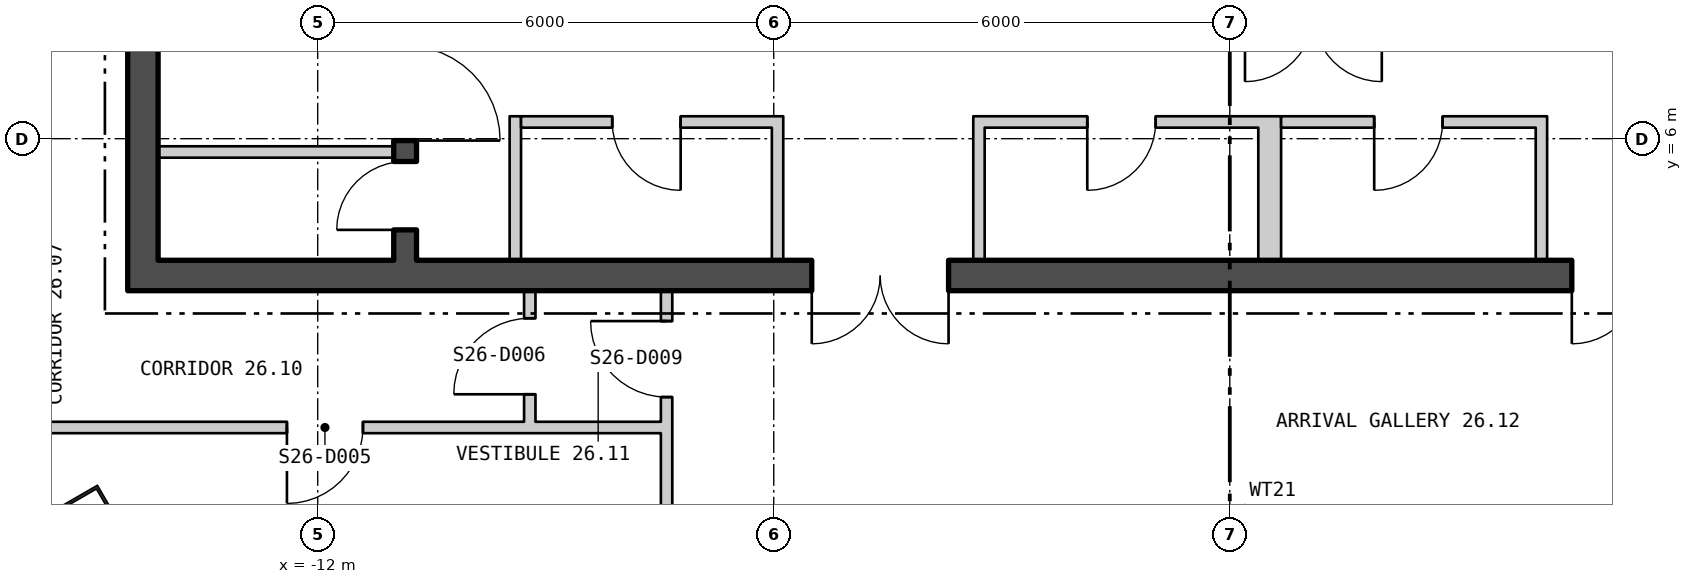
"""IFC4 building model, lengths in metres.
Left out: names, types, materials, properties, quantities, classifications, styles, units other than length and angle.
Written with IfcOpenShell. Run it as: python <this file> out.ifc"""

import sys

from ifc_helpers import new_model, si_unit, direction, frame, frame_2d, origin, origin_2d, place, context, subcontext, project, spatial, polyline, rectangle, hollow_rectangle, outline, extrude, element, fill, save


model = new_model("IFC4")
c1 = context("Model", 3, precision=1e-05, world=origin(), true_north=direction((0.0, 1.0)))
c2 = subcontext(c1, "Body", "Model", "MODEL_VIEW")
j1 = project(units=[si_unit("LENGTHUNIT", "METRE"), si_unit("PLANEANGLEUNIT", "RADIAN")], contexts=[c1])
p1 = place(None, origin())
s1 = spatial("IfcSite", under=j1, at=p1, CompositionType="ELEMENT")
p2 = place(p1, origin())
s2 = spatial("IfcBuilding", under=s1, at=p2, CompositionType="ELEMENT")
p3 = place(p2, frame((0.0, 0.0, 329.4)))
s3 = spatial("IfcBuildingStorey", under=s2, at=p3, CompositionType="ELEMENT", Elevation=329.4)
p4 = place(p3, frame((-15.088, 1.073, 0.0), z_axis=(0.0, 0.0, 1.0), x_axis=(0.5, -0.866025403784, 0.0)))
e1 = element("IfcColumn", 1, at=p4, inside=s3, PredefinedType="COLUMN", context=c2, shape_type="SweptSolid", body=[
    extrude(hollow_rectangle(XDim=0.45, YDim=0.7, WallThickness=0.04, at=origin_2d()), origin(), (0.0, 0.0, 1.0), 4.2),
])
p5 = place(p3, frame((-24.765, 16.684, -0.18), z_axis=(0.0, 0.0, 1.0), x_axis=(0.500000141277, -0.866025322218, 0.0)))
e2 = element("IfcWall", 2, at=p5, inside=s3, PredefinedType="SOLIDWALL", context=c2, shape_type="SweptSolid", body=[
    extrude(outline(polyline([(-0.13, -0.225), (45.86, -0.225), (45.6, 0.225), (0.13, 0.225), (-0.13, -0.225)])), origin(), (0.0, 0.0, 1.0), 3.98),
])
p6 = place(p5, frame((1.424, 0.0, 1.08)))
e3 = element("IfcOpeningElement", 3, at=p6, cuts=e2, PredefinedType="OPENING", context=c2, shape_type="SweptSolid", body=[
    extrude(rectangle(XDim=2.4, YDim=2.3, at=frame_2d((1.2, 1.15))), frame((0.0, 0.235, 0.0), z_axis=(0.0, -1.0, 0.0), x_axis=(1.0, 0.0, 0.0)), (0.0, 0.0, 1.0), 0.47),
])
p7 = place(p5, frame((5.892, 0.0, 1.08)))
e4 = element("IfcOpeningElement", 4, at=p7, cuts=e2, PredefinedType="OPENING", context=c2, shape_type="SweptSolid", body=[
    extrude(rectangle(XDim=2.4, YDim=2.3, at=frame_2d((1.2, 1.15))), frame((0.0, 0.235, 0.0), z_axis=(0.0, -1.0, 0.0), x_axis=(1.0, 0.0, 0.0)), (0.0, 0.0, 1.0), 0.47),
])
p8 = place(p5, frame((10.399, 0.0, 1.08)))
e5 = element("IfcOpeningElement", 5, at=p8, cuts=e2, PredefinedType="OPENING", context=c2, shape_type="SweptSolid", body=[
    extrude(rectangle(XDim=2.4, YDim=2.3, at=frame_2d((1.2, 1.15))), frame((0.0, 0.235, 0.0), z_axis=(0.0, -1.0, 0.0), x_axis=(1.0, 0.0, 0.0)), (0.0, 0.0, 1.0), 0.47),
])
p9 = place(p5, frame((19.412, 0.0, 1.08)))
e6 = element("IfcOpeningElement", 6, at=p9, cuts=e2, PredefinedType="OPENING", context=c2, shape_type="SweptSolid", body=[
    extrude(rectangle(XDim=2.4, YDim=2.3, at=frame_2d((1.2, 1.15))), frame((0.0, 0.235, 0.0), z_axis=(0.0, -1.0, 0.0), x_axis=(1.0, 0.0, 0.0)), (0.0, 0.0, 1.0), 0.47),
])
p10 = place(p5, frame((23.918, 0.0, 1.08)))
e7 = element("IfcOpeningElement", 7, at=p10, cuts=e2, PredefinedType="OPENING", context=c2, shape_type="SweptSolid", body=[
    extrude(rectangle(XDim=2.4, YDim=2.3, at=frame_2d((1.2, 1.15))), frame((0.0, 0.235, 0.0), z_axis=(0.0, -1.0, 0.0), x_axis=(1.0, 0.0, 0.0)), (0.0, 0.0, 1.0), 0.47),
])
p11 = place(p5, frame((28.425, 0.0, 1.08)))
e8 = element("IfcOpeningElement", 8, at=p11, cuts=e2, PredefinedType="OPENING", context=c2, shape_type="SweptSolid", body=[
    extrude(rectangle(XDim=2.4, YDim=2.3, at=frame_2d((1.2, 1.15))), frame((0.0, 0.235, 0.0), z_axis=(0.0, -1.0, 0.0), x_axis=(1.0, 0.0, 0.0)), (0.0, 0.0, 1.0), 0.47),
])
p12 = place(p5, frame((37.438, 0.0, 1.08)))
e9 = element("IfcOpeningElement", 9, at=p12, cuts=e2, PredefinedType="OPENING", context=c2, shape_type="SweptSolid", body=[
    extrude(rectangle(XDim=2.4, YDim=2.3, at=frame_2d((1.2, 1.15))), frame((0.0, 0.235, 0.0), z_axis=(0.0, -1.0, 0.0), x_axis=(1.0, 0.0, 0.0)), (0.0, 0.0, 1.0), 0.47),
])
p13 = place(p5, frame((41.907, 0.0, 1.08)))
e10 = element("IfcOpeningElement", 10, at=p13, cuts=e2, PredefinedType="OPENING", context=c2, shape_type="SweptSolid", body=[
    extrude(rectangle(XDim=2.4, YDim=2.3, at=frame_2d((1.2, 1.15))), frame((0.0, 0.235, 0.0), z_axis=(0.0, -1.0, 0.0), x_axis=(1.0, 0.0, 0.0)), (0.0, 0.0, 1.0), 0.47),
])
p14 = place(p3, frame((1.9, -22.92, -0.18), z_axis=(0.0, 0.0, 1.0), x_axis=(0.500000141277, 0.866025322218, 0.0)))
e11 = element("IfcWall", 11, at=p14, inside=s3, PredefinedType="SOLIDWALL", context=c2, shape_type="SweptSolid", body=[
    extrude(outline(polyline([(-0.13, -0.225), (45.86, -0.225), (45.6, 0.225), (0.13, 0.225), (-0.13, -0.225)])), origin(), (0.0, 0.0, 1.0), 3.98),
])
p15 = place(p14, frame((1.424, 0.0, 1.08)))
e12 = element("IfcOpeningElement", 12, at=p15, cuts=e11, PredefinedType="OPENING", context=c2, shape_type="SweptSolid", body=[
    extrude(rectangle(XDim=2.4, YDim=2.3, at=frame_2d((1.2, 1.15))), frame((0.0, 0.235, 0.0), z_axis=(0.0, -1.0, 0.0), x_axis=(1.0, 0.0, 0.0)), (0.0, 0.0, 1.0), 0.47),
])
p16 = place(p14, frame((5.892, 0.0, 1.08)))
e13 = element("IfcOpeningElement", 13, at=p16, cuts=e11, PredefinedType="OPENING", context=c2, shape_type="SweptSolid", body=[
    extrude(rectangle(XDim=2.4, YDim=2.3, at=frame_2d((1.2, 1.15))), frame((0.0, 0.235, 0.0), z_axis=(0.0, -1.0, 0.0), x_axis=(1.0, 0.0, 0.0)), (0.0, 0.0, 1.0), 0.47),
])
p17 = place(p14, frame((14.905, 0.0, 1.08)))
e14 = element("IfcOpeningElement", 14, at=p17, cuts=e11, PredefinedType="OPENING", context=c2, shape_type="SweptSolid", body=[
    extrude(rectangle(XDim=2.4, YDim=2.3, at=frame_2d((1.2, 1.15))), frame((0.0, 0.235, 0.0), z_axis=(0.0, -1.0, 0.0), x_axis=(1.0, 0.0, 0.0)), (0.0, 0.0, 1.0), 0.47),
])
p18 = place(p14, frame((19.412, 0.0, 1.08)))
e15 = element("IfcOpeningElement", 15, at=p18, cuts=e11, PredefinedType="OPENING", context=c2, shape_type="SweptSolid", body=[
    extrude(rectangle(XDim=2.4, YDim=2.3, at=frame_2d((1.2, 1.15))), frame((0.0, 0.235, 0.0), z_axis=(0.0, -1.0, 0.0), x_axis=(1.0, 0.0, 0.0)), (0.0, 0.0, 1.0), 0.47),
])
p19 = place(p14, frame((23.918, 0.0, 1.08)))
e16 = element("IfcOpeningElement", 16, at=p19, cuts=e11, PredefinedType="OPENING", context=c2, shape_type="SweptSolid", body=[
    extrude(rectangle(XDim=2.4, YDim=2.3, at=frame_2d((1.2, 1.15))), frame((0.0, 0.235, 0.0), z_axis=(0.0, -1.0, 0.0), x_axis=(1.0, 0.0, 0.0)), (0.0, 0.0, 1.0), 0.47),
])
p20 = place(p14, frame((32.932, 0.0, 1.08)))
e17 = element("IfcOpeningElement", 17, at=p20, cuts=e11, PredefinedType="OPENING", context=c2, shape_type="SweptSolid", body=[
    extrude(rectangle(XDim=2.4, YDim=2.3, at=frame_2d((1.2, 1.15))), frame((0.0, 0.235, 0.0), z_axis=(0.0, -1.0, 0.0), x_axis=(1.0, 0.0, 0.0)), (0.0, 0.0, 1.0), 0.47),
])
p21 = place(p14, frame((37.438, 0.0, 1.08)))
e18 = element("IfcOpeningElement", 18, at=p21, cuts=e11, PredefinedType="OPENING", context=c2, shape_type="SweptSolid", body=[
    extrude(rectangle(XDim=2.4, YDim=2.3, at=frame_2d((1.2, 1.15))), frame((0.0, 0.235, 0.0), z_axis=(0.0, -1.0, 0.0), x_axis=(1.0, 0.0, 0.0)), (0.0, 0.0, 1.0), 0.47),
])
p22 = place(p14, frame((41.907, 0.0, 1.08)))
e19 = element("IfcOpeningElement", 19, at=p22, cuts=e11, PredefinedType="OPENING", context=c2, shape_type="SweptSolid", body=[
    extrude(rectangle(XDim=2.4, YDim=2.3, at=frame_2d((1.2, 1.15))), frame((0.0, 0.235, 0.0), z_axis=(0.0, -1.0, 0.0), x_axis=(1.0, 0.0, 0.0)), (0.0, 0.0, 1.0), 0.47),
])
p23 = place(p3, frame((-14.5, 4.2, 0.0), z_axis=(0.0, 0.0, 1.0), x_axis=(1.0, 0.0, 0.0)))
e20 = element("IfcWall", 20, at=p23, inside=s3, PredefinedType="SHEAR", context=c2, shape_type="SweptSolid", body=[
    extrude(rectangle(XDim=29.0, YDim=0.4, at=frame_2d((14.5, 0.0))), origin(), (0.0, 0.0, 1.0), 4.0),
])
p24 = place(p23, frame((9.0, 0.0, 0.0)))
e21 = element("IfcOpeningElement", 21, at=p24, cuts=e20, PredefinedType="OPENING", context=c2, shape_type="SweptSolid", body=[
    extrude(rectangle(XDim=1.8, YDim=2.4, at=frame_2d((0.9, 1.2))), frame((0.0, 0.21, 0.0), z_axis=(0.0, -1.0, 0.0), x_axis=(1.0, 0.0, 0.0)), (0.0, 0.0, 1.0), 0.42),
])
p25 = place(p23, frame((19.0, 0.0, 0.0)))
e22 = element("IfcOpeningElement", 22, at=p25, cuts=e20, PredefinedType="OPENING", context=c2, shape_type="SweptSolid", body=[
    extrude(rectangle(XDim=1.8, YDim=2.4, at=frame_2d((0.9, 1.2))), frame((0.0, 0.21, 0.0), z_axis=(0.0, -1.0, 0.0), x_axis=(1.0, 0.0, 0.0)), (0.0, 0.0, 1.0), 0.42),
])
p26 = place(p3, frame((-14.3, 4.4, 0.0), z_axis=(0.0, 0.0, 1.0), x_axis=(0.0, 1.0, 0.0)))
e23 = element("IfcWall", 23, at=p26, inside=s3, PredefinedType="SHEAR", context=c2, shape_type="SweptSolid", body=[
    extrude(rectangle(XDim=13.2, YDim=0.4, at=frame_2d((6.6, 0.0))), origin(), (0.0, 0.0, 1.0), 4.0),
])
p27 = place(p26, frame((3.05, 0.0, 0.0)))
e24 = element("IfcOpeningElement", 24, at=p27, cuts=e23, PredefinedType="OPENING", context=c2, shape_type="SweptSolid", body=[
    extrude(rectangle(XDim=1.5, YDim=2.1, at=frame_2d((0.75, 1.05))), frame((0.0, 0.21, 0.0), z_axis=(0.0, -1.0, 0.0), x_axis=(1.0, 0.0, 0.0)), (0.0, 0.0, 1.0), 0.42),
])
p28 = place(p3, frame((-10.85, 4.4, 0.0), z_axis=(0.0, 0.0, 1.0), x_axis=(0.0, 1.0, 0.0)))
e25 = element("IfcWall", 25, at=p28, inside=s3, PredefinedType="SHEAR", context=c2, shape_type="SweptSolid", body=[
    extrude(rectangle(XDim=13.2, YDim=0.3, at=frame_2d((6.6, 0.0))), origin(), (0.0, 0.0, 1.0), 4.0),
])
p29 = place(p28, frame((1.575, 0.0, 0.0)))
e26 = element("IfcOpeningElement", 26, at=p29, cuts=e25, PredefinedType="OPENING", context=c2, shape_type="SweptSolid", body=[
    extrude(rectangle(XDim=1.25, YDim=2.1, at=frame_2d((0.625, 1.05))), frame((0.0, 0.16, 0.0), z_axis=(0.0, -1.0, 0.0), x_axis=(1.0, 0.0, 0.0)), (0.0, 0.0, 1.0), 0.32),
])
p30 = place(p28, frame((0.4, 0.0, 0.0)))
e27 = element("IfcOpeningElement", 27, at=p30, cuts=e25, PredefinedType="OPENING", context=c2, shape_type="SweptSolid", body=[
    extrude(rectangle(XDim=0.9, YDim=2.1, at=frame_2d((0.45, 1.05))), frame((0.0, 0.16, 0.0), z_axis=(0.0, -1.0, 0.0), x_axis=(1.0, 0.0, 0.0)), (0.0, 0.0, 1.0), 0.32),
])
p31 = place(p3, frame((-14.1, 5.825, 0.0), z_axis=(0.0, 0.0, 1.0), x_axis=(1.0, 0.0, 0.0)))
e28 = element("IfcWall", 28, at=p31, inside=s3, PredefinedType="PARTITIONING", context=c2, shape_type="SweptSolid", body=[
    extrude(rectangle(XDim=3.1, YDim=0.15, at=frame_2d((1.55, 0.0))), origin(), (0.0, 0.0, 1.0), 4.0),
])
for number, where, z_axis, x_axis in (
    (29, (-9.4, 4.4, 0.0), (0.0, 0.0, 1.0), (0.0, 1.0, 0.0)),
    (30, (-5.95, 4.4, 0.0), (0.0, 0.0, 1.0), (0.0, 1.0, 0.0)),
):
    element("IfcWall", number, at=place(p3, frame(where, z_axis=z_axis, x_axis=x_axis)), inside=s3, PredefinedType="PARTITIONING", context=c2, shape_type="SweptSolid", body=[
        extrude(rectangle(XDim=1.895, YDim=0.15, at=frame_2d((0.948, 0.0))), origin(), (0.0, 0.0, 1.0), 4.0),
    ])
p32 = place(p3, frame((-9.325, 6.22, 0.0), z_axis=(0.0, 0.0, 1.0), x_axis=(1.0, 0.0, 0.0)))
e31 = element("IfcWall", 31, at=p32, inside=s3, PredefinedType="PARTITIONING", context=c2, shape_type="SweptSolid", body=[
    extrude(rectangle(XDim=3.3, YDim=0.15, at=frame_2d((1.65, 0.0))), origin(), (0.0, 0.0, 1.0), 4.0),
])
p33 = place(p32, frame((1.2, 0.0, 0.0)))
e32 = element("IfcOpeningElement", 32, at=p33, cuts=e31, PredefinedType="OPENING", context=c2, shape_type="SweptSolid", body=[
    extrude(rectangle(XDim=0.9, YDim=2.1, at=frame_2d((0.45, 1.05))), frame((0.0, 0.085, 0.0), z_axis=(0.0, -1.0, 0.0), x_axis=(1.0, 0.0, 0.0)), (0.0, 0.0, 1.0), 0.17),
])
for number, where, z_axis, x_axis in (
    (33, (-3.3, 4.4, 0.0), (0.0, 0.0, 1.0), (0.0, 1.0, 0.0)),
    (34, (0.45, 4.4, 0.0), (0.0, 0.0, 1.0), (0.0, 1.0, 0.0)),
):
    element("IfcWall", number, at=place(p3, frame(where, z_axis=z_axis, x_axis=x_axis)), inside=s3, PredefinedType="PARTITIONING", context=c2, shape_type="SweptSolid", body=[
        extrude(rectangle(XDim=1.895, YDim=0.15, at=frame_2d((0.948, 0.0))), origin(), (0.0, 0.0, 1.0), 4.0),
    ])
p34 = place(p3, frame((-3.225, 6.22, 0.0), z_axis=(0.0, 0.0, 1.0), x_axis=(1.0, 0.0, 0.0)))
e35 = element("IfcWall", 35, at=p34, inside=s3, PredefinedType="PARTITIONING", context=c2, shape_type="SweptSolid", body=[
    extrude(rectangle(XDim=3.6, YDim=0.15, at=frame_2d((1.8, 0.0))), origin(), (0.0, 0.0, 1.0), 4.0),
])
p35 = place(p34, frame((1.35, 0.0, 0.0)))
e36 = element("IfcOpeningElement", 36, at=p35, cuts=e35, PredefinedType="OPENING", context=c2, shape_type="SweptSolid", body=[
    extrude(rectangle(XDim=0.9, YDim=2.1, at=frame_2d((0.45, 1.05))), frame((0.0, 0.085, 0.0), z_axis=(0.0, -1.0, 0.0), x_axis=(1.0, 0.0, 0.0)), (0.0, 0.0, 1.0), 0.17),
])
for number, where, z_axis, x_axis in (
    (37, (0.6, 4.4, 0.0), (0.0, 0.0, 1.0), (0.0, 1.0, 0.0)),
    (38, (4.1, 4.4, 0.0), (0.0, 0.0, 1.0), (0.0, 1.0, 0.0)),
):
    element("IfcWall", number, at=place(p3, frame(where, z_axis=z_axis, x_axis=x_axis)), inside=s3, PredefinedType="PARTITIONING", context=c2, shape_type="SweptSolid", body=[
        extrude(rectangle(XDim=1.895, YDim=0.15, at=frame_2d((0.948, 0.0))), origin(), (0.0, 0.0, 1.0), 4.0),
    ])
p36 = place(p3, frame((0.675, 6.22, 0.0), z_axis=(0.0, 0.0, 1.0), x_axis=(1.0, 0.0, 0.0)))
e39 = element("IfcWall", 39, at=p36, inside=s3, PredefinedType="PARTITIONING", context=c2, shape_type="SweptSolid", body=[
    extrude(rectangle(XDim=3.35, YDim=0.15, at=frame_2d((1.675, 0.0))), origin(), (0.0, 0.0, 1.0), 4.0),
])
p37 = place(p36, frame((1.225, 0.0, 0.0)))
e40 = element("IfcOpeningElement", 40, at=p37, cuts=e39, PredefinedType="OPENING", context=c2, shape_type="SweptSolid", body=[
    extrude(rectangle(XDim=0.9, YDim=2.1, at=frame_2d((0.45, 1.05))), frame((0.0, 0.085, 0.0), z_axis=(0.0, -1.0, 0.0), x_axis=(1.0, 0.0, 0.0)), (0.0, 0.0, 1.0), 0.17),
])
p38 = place(p3, frame((-16.143, 2.2, 0.0), z_axis=(0.0, 0.0, 1.0), x_axis=(1.0, 0.0, 0.0)))
e41 = element("IfcWall", 41, at=p38, inside=s3, PredefinedType="PARTITIONING", context=c2, shape_type="SweptSolid", body=[
    extrude(rectangle(XDim=8.658, YDim=0.15, at=frame_2d((4.329, 0.0))), origin(), (0.0, 0.0, 1.0), 4.0),
])
p39 = place(p38, frame((3.738, 0.0, 0.0)))
e42 = element("IfcOpeningElement", 42, at=p39, cuts=e41, PredefinedType="OPENING", context=c2, shape_type="SweptSolid", body=[
    extrude(rectangle(XDim=1.0, YDim=2.1, at=frame_2d((0.5, 1.05))), frame((0.0, 0.085, 0.0), z_axis=(0.0, -1.0, 0.0), x_axis=(1.0, 0.0, 0.0)), (0.0, 0.0, 1.0), 0.17),
])
p40 = place(p3, frame((-9.21, 2.275, 0.0), z_axis=(0.0, 0.0, 1.0), x_axis=(0.0, 1.0, 0.0)))
e43 = element("IfcWall", 43, at=p40, inside=s3, PredefinedType="PARTITIONING", context=c2, shape_type="SweptSolid", body=[
    extrude(rectangle(XDim=1.725, YDim=0.15, at=frame_2d((0.863, 0.0))), origin(), (0.0, 0.0, 1.0), 4.0),
])
p41 = place(p40, frame((0.362, 0.0, 0.0)))
e44 = element("IfcOpeningElement", 44, at=p41, cuts=e43, PredefinedType="OPENING", context=c2, shape_type="SweptSolid", body=[
    extrude(rectangle(XDim=1.0, YDim=2.1, at=frame_2d((0.5, 1.05))), frame((0.0, 0.085, 0.0), z_axis=(0.0, -1.0, 0.0), x_axis=(1.0, 0.0, 0.0)), (0.0, 0.0, 1.0), 0.17),
])
p42 = place(p3, frame((-7.41, -12.926, 0.0), z_axis=(0.0, 0.0, 1.0), x_axis=(0.0, 1.0, 0.0)))
e45 = element("IfcWall", 45, at=p42, inside=s3, PredefinedType="PARTITIONING", context=c2, shape_type="SweptSolid", body=[
    extrude(rectangle(XDim=16.926, YDim=0.15, at=frame_2d((8.463, 0.0))), origin(), (0.0, 0.0, 1.0), 4.0),
])
p43 = place(p42, frame((3.512, 0.0, 0.0)))
e46 = element("IfcOpeningElement", 46, at=p43, cuts=e45, PredefinedType="OPENING", context=c2, shape_type="SweptSolid", body=[
    extrude(rectangle(XDim=1.0, YDim=2.1, at=frame_2d((0.5, 1.05))), frame((0.0, 0.085, 0.0), z_axis=(0.0, -1.0, 0.0), x_axis=(1.0, 0.0, 0.0)), (0.0, 0.0, 1.0), 0.17),
])
p44 = place(p42, frame((11.427, 0.0, 0.0)))
e47 = element("IfcOpeningElement", 47, at=p44, cuts=e45, PredefinedType="OPENING", context=c2, shape_type="SweptSolid", body=[
    extrude(rectangle(XDim=1.0, YDim=2.1, at=frame_2d((0.5, 1.05))), frame((0.0, 0.085, 0.0), z_axis=(0.0, -1.0, 0.0), x_axis=(1.0, 0.0, 0.0)), (0.0, 0.0, 1.0), 0.17),
])
p45 = place(p42, frame((15.526, 0.0, 0.0)))
e48 = element("IfcOpeningElement", 48, at=p45, cuts=e45, PredefinedType="OPENING", context=c2, shape_type="SweptSolid", body=[
    extrude(rectangle(XDim=1.0, YDim=2.1, at=frame_2d((0.5, 1.05))), frame((0.0, 0.085, 0.0), z_axis=(0.0, -1.0, 0.0), x_axis=(1.0, 0.0, 0.0)), (0.0, 0.0, 1.0), 0.17),
])
p46 = place(p29, origin())
e49 = element("IfcDoor", 49, at=p46, inside=s3, OperationType="SINGLE_SWING_LEFT", PredefinedType="DOOR", context=c2, shape_type="SweptSolid", body=[
    extrude(rectangle(XDim=1.25, YDim=2.1, at=frame_2d((0.625, 1.05))), frame((0.0, 0.025, 0.0), z_axis=(0.0, -1.0, 0.0), x_axis=(1.0, 0.0, 0.0)), (0.0, 0.0, 1.0), 0.05),
])
fill(e26, e49)
p47 = place(p30, origin())
e50 = element("IfcDoor", 50, at=p47, inside=s3, OperationType="SINGLE_SWING_RIGHT", PredefinedType="DOOR", context=c2, shape_type="SweptSolid", body=[
    extrude(rectangle(XDim=0.9, YDim=2.1, at=frame_2d((0.45, 1.05))), frame((0.0, 0.025, 0.0), z_axis=(0.0, -1.0, 0.0), x_axis=(1.0, 0.0, 0.0)), (0.0, 0.0, 1.0), 0.05),
])
fill(e27, e50)
p48 = place(p33, origin())
e51 = element("IfcDoor", 51, at=p48, inside=s3, OperationType="SINGLE_SWING_RIGHT", PredefinedType="DOOR", context=c2, shape_type="SweptSolid", body=[
    extrude(rectangle(XDim=0.9, YDim=2.1, at=frame_2d((0.45, 1.05))), frame((0.0, 0.025, 0.0), z_axis=(0.0, -1.0, 0.0), x_axis=(1.0, 0.0, 0.0)), (0.0, 0.0, 1.0), 0.05),
])
fill(e32, e51)
p49 = place(p35, origin())
e52 = element("IfcDoor", 52, at=p49, inside=s3, OperationType="SINGLE_SWING_LEFT", PredefinedType="DOOR", context=c2, shape_type="SweptSolid", body=[
    extrude(rectangle(XDim=0.9, YDim=2.1, at=frame_2d((0.45, 1.05))), frame((0.0, 0.025, 0.0), z_axis=(0.0, -1.0, 0.0), x_axis=(1.0, 0.0, 0.0)), (0.0, 0.0, 1.0), 0.05),
])
fill(e36, e52)
p50 = place(p37, origin())
e53 = element("IfcDoor", 53, at=p50, inside=s3, OperationType="SINGLE_SWING_LEFT", PredefinedType="DOOR", context=c2, shape_type="SweptSolid", body=[
    extrude(rectangle(XDim=0.9, YDim=2.1, at=frame_2d((0.45, 1.05))), frame((0.0, 0.025, 0.0), z_axis=(0.0, -1.0, 0.0), x_axis=(1.0, 0.0, 0.0)), (0.0, 0.0, 1.0), 0.05),
])
fill(e40, e53)
p51 = place(p24, origin())
e54 = element("IfcDoor", 54, at=p51, inside=s3, OperationType="DOUBLE_DOOR_SINGLE_SWING", PredefinedType="DOOR", context=c2, shape_type="SweptSolid", body=[
    extrude(rectangle(XDim=1.8, YDim=2.4, at=frame_2d((0.9, 1.2))), frame((0.0, 0.025, 0.0), z_axis=(0.0, -1.0, 0.0), x_axis=(1.0, 0.0, 0.0)), (0.0, 0.0, 1.0), 0.05),
])
fill(e21, e54)
p52 = place(p25, origin())
e55 = element("IfcDoor", 55, at=p52, inside=s3, OperationType="DOUBLE_DOOR_SINGLE_SWING", PredefinedType="DOOR", context=c2, shape_type="SweptSolid", body=[
    extrude(rectangle(XDim=1.8, YDim=2.4, at=frame_2d((0.9, 1.2))), frame((0.0, 0.025, 0.0), z_axis=(0.0, -1.0, 0.0), x_axis=(1.0, 0.0, 0.0)), (0.0, 0.0, 1.0), 0.05),
])
fill(e22, e55)
p53 = place(p39, origin())
e56 = element("IfcDoor", 56, at=p53, inside=s3, OperationType="SINGLE_SWING_LEFT", PredefinedType="DOOR", context=c2, shape_type="SweptSolid", body=[
    extrude(rectangle(XDim=1.0, YDim=2.1, at=frame_2d((0.5, 1.05))), frame((0.0, 0.025, 0.0), z_axis=(0.0, -1.0, 0.0), x_axis=(1.0, 0.0, 0.0)), (0.0, 0.0, 1.0), 0.05),
])
fill(e42, e56)
p54 = place(p41, origin())
e57 = element("IfcDoor", 57, at=p54, inside=s3, OperationType="SINGLE_SWING_RIGHT", PredefinedType="DOOR", context=c2, shape_type="SweptSolid", body=[
    extrude(rectangle(XDim=1.0, YDim=2.1, at=frame_2d((0.5, 1.05))), frame((0.0, 0.025, 0.0), z_axis=(0.0, -1.0, 0.0), x_axis=(1.0, 0.0, 0.0)), (0.0, 0.0, 1.0), 0.05),
])
fill(e44, e57)
p55 = place(p45, origin())
e58 = element("IfcDoor", 58, at=p55, inside=s3, OperationType="SINGLE_SWING_LEFT", PredefinedType="DOOR", context=c2, shape_type="SweptSolid", body=[
    extrude(rectangle(XDim=1.0, YDim=2.1, at=frame_2d((0.5, 1.05))), frame((0.0, 0.025, 0.0), z_axis=(0.0, -1.0, 0.0), x_axis=(1.0, 0.0, 0.0)), (0.0, 0.0, 1.0), 0.05),
])
fill(e48, e58)
save(model, sys.argv[1])
